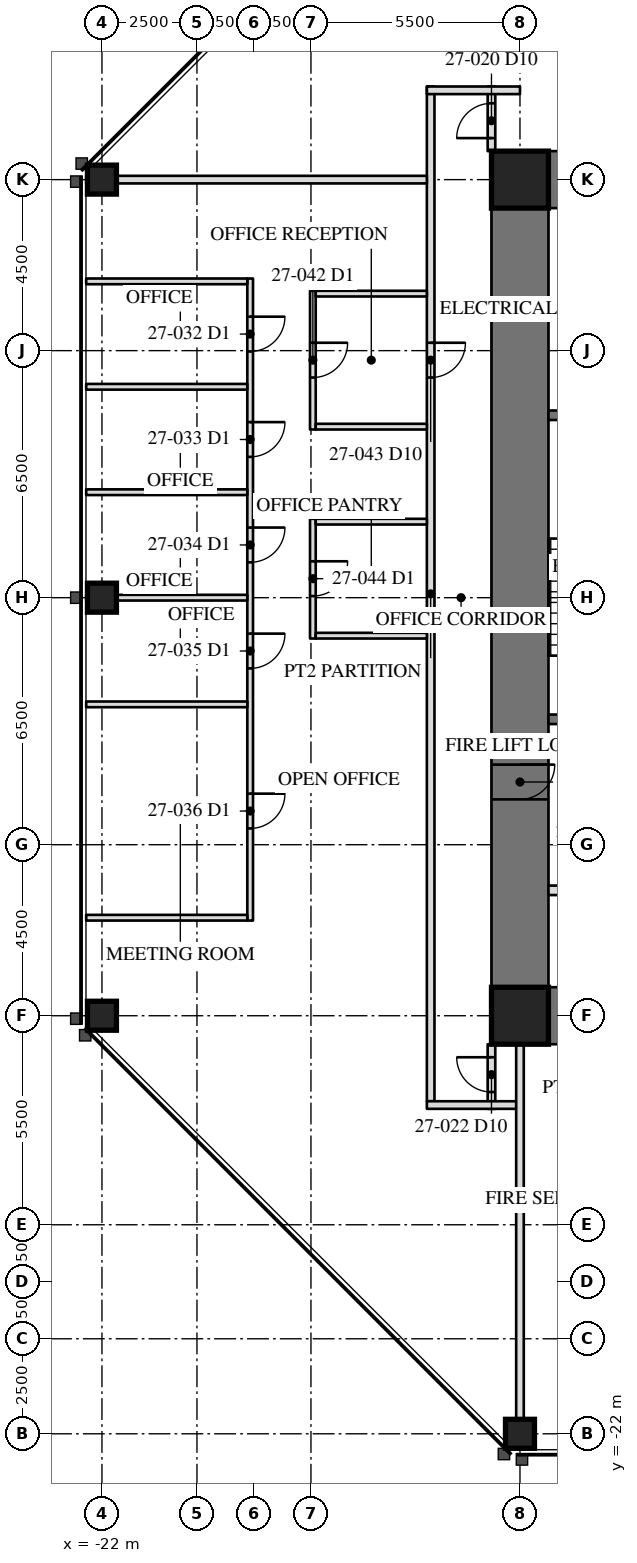
"""IFC4 building model, lengths in metres.
Left out: names, types, materials, properties, quantities, classifications, styles, units other than length and angle.
Written with IfcOpenShell. Run it as: python <this file> out.ifc"""

import sys

from ifc_helpers import new_model, si_unit, direction, frame, frame_2d, origin, origin_2d, place, context, subcontext, project, spatial, rectangle, hollow_rectangle, extrude, element, fill, save


model = new_model("IFC4")
c1 = context("Model", 3, precision=1e-05, world=origin(), true_north=direction((0.0, 1.0)))
c2 = subcontext(c1, "Body", "Model", "MODEL_VIEW")
j1 = project(units=[si_unit("LENGTHUNIT", "METRE"), si_unit("PLANEANGLEUNIT", "RADIAN")], contexts=[c1])
p1 = place(None, origin())
s1 = spatial("IfcSite", under=j1, at=p1, CompositionType="ELEMENT")
p2 = place(p1, origin())
s2 = spatial("IfcBuilding", under=s1, at=p2, CompositionType="ELEMENT")
p3 = place(p2, frame((0.0, 0.0, 117.2)))
s3 = spatial("IfcBuildingStorey", under=s2, at=p3, CompositionType="ELEMENT", Elevation=117.2)
for number, where, z_axis, x_axis in (
    (1, (-22.0, 0.0, 0.0), (0.0, 0.0, 1.0), (0.0, 1.0, 0.0)),
    (2, (-22.0, -11.0, 0.0), (0.0, 0.0, 1.0), (0.0, 1.0, 0.0)),
    (3, (-11.0, -22.0, 0.0), (0.0, 0.0, 1.0), (1.0, 0.0, 0.0)),
    (4, (-22.0, 11.0, 0.0), (0.0, 0.0, 1.0), (0.0, 1.0, 0.0)),
):
    element("IfcColumn", number, at=place(p3, frame(where, z_axis=z_axis, x_axis=x_axis)), inside=s3, PredefinedType="COLUMN", context=c2, shape_type="SweptSolid", body=[
        extrude(hollow_rectangle(XDim=0.762, YDim=0.762, WallThickness=0.127, at=origin_2d()), origin(), (0.0, 0.0, 1.0), 4.1),
    ])
p4 = place(p3, frame((-11.0, 11.0, 0.0), z_axis=(0.0, 0.0, 1.0), x_axis=(0.0, -1.0, 0.0)))
e5 = element("IfcWall", 5, at=p4, inside=s3, PredefinedType="SHEAR", context=c2, shape_type="SweptSolid", body=[
    extrude(rectangle(XDim=22.0, YDim=1.5, at=frame_2d((11.0, 0.0))), origin(), (0.0, 0.0, 1.0), 4.1),
])
p5 = place(p4, frame((15.393, 0.0, 0.0)))
e6 = element("IfcOpeningElement", 6, at=p5, cuts=e5, PredefinedType="OPENING", context=c2, shape_type="SweptSolid", body=[
    extrude(rectangle(XDim=0.915, YDim=2.134, at=frame_2d((0.458, 1.067))), frame((0.0, 0.76, 0.0), z_axis=(0.0, -1.0, 0.0), x_axis=(1.0, 0.0, 0.0)), (0.0, 0.0, 1.0), 1.52),
])
for number, where, z_axis, x_axis in (
    (7, (-6.5, 11.0, 0.0), (0.0, 0.0, 1.0), (-1.0, 0.0, 0.0)),
    (8, (-11.0, -11.0, 0.0), (0.0, 0.0, 1.0), (1.0, 0.0, 0.0)),
):
    element("IfcWall", number, at=place(p3, frame(where, z_axis=z_axis, x_axis=x_axis)), inside=s3, PredefinedType="SHEAR", context=c2, shape_type="SweptSolid", body=[
        extrude(rectangle(XDim=4.5, YDim=1.5, at=frame_2d((2.25, 0.0))), origin(), (0.0, 0.0, 1.0), 4.1),
    ])
for number, where, z_axis, x_axis in (
    (9, (-11.0, 11.0, 0.0), (0.0, 0.0, 1.0), (1.0, 0.0, 0.0)),
    (10, (-11.0, -11.0, 0.0), (0.0, 0.0, 1.0), (1.0, 0.0, 0.0)),
):
    element("IfcColumn", number, at=place(p3, frame(where, z_axis=z_axis, x_axis=x_axis)), inside=s3, PredefinedType="COLUMN", context=c2, shape_type="SweptSolid", body=[
        extrude(hollow_rectangle(XDim=1.499, YDim=1.499, WallThickness=0.102, at=origin_2d()), origin(), (0.0, 0.0, 1.0), 4.1),
    ])
p6 = place(p3, frame((-6.95, 4.8, 0.0), z_axis=(0.0, 0.0, 1.0), x_axis=(-1.0, 0.0, 0.0)))
e11 = element("IfcWall", 11, at=p6, inside=s3, PredefinedType="SOLIDWALL", context=c2, shape_type="SweptSolid", body=[
    extrude(rectangle(XDim=3.3, YDim=0.25, at=frame_2d((1.65, 0.0))), origin(), (0.0, 0.0, 1.0), 3.91),
])
p7 = place(p3, frame((-6.95, -3.2, 0.0), z_axis=(0.0, 0.0, 1.0), x_axis=(-1.0, 0.0, 0.0)))
e12 = element("IfcWall", 12, at=p7, inside=s3, PredefinedType="SOLIDWALL", context=c2, shape_type="SweptSolid", body=[
    extrude(rectangle(XDim=3.3, YDim=0.25, at=frame_2d((1.65, 0.0))), origin(), (0.0, 0.0, 1.0), 3.91),
])
p8 = place(p7, frame((1.116, 0.0, 0.0)))
e13 = element("IfcOpeningElement", 13, at=p8, cuts=e12, PredefinedType="OPENING", context=c2, shape_type="SweptSolid", body=[
    extrude(rectangle(XDim=1.067, YDim=2.134, at=frame_2d((0.533, 1.067))), frame((0.0, 0.135, 0.0), z_axis=(0.0, -1.0, 0.0), x_axis=(1.0, 0.0, 0.0)), (0.0, 0.0, 1.0), 0.27),
])
p9 = place(p3, frame((-6.95, -7.7, 0.0), z_axis=(0.0, 0.0, 1.0), x_axis=(-1.0, 0.0, 0.0)))
e14 = element("IfcWall", 14, at=p9, inside=s3, PredefinedType="PARTITIONING", context=c2, shape_type="SweptSolid", body=[
    extrude(rectangle(XDim=3.3, YDim=0.25, at=frame_2d((1.65, 0.0))), origin(), (0.0, 0.0, 1.0), 3.91),
])
p10 = place(p9, frame((0.45, 0.0, 0.0)))
e15 = element("IfcOpeningElement", 15, at=p10, cuts=e14, PredefinedType="OPENING", context=c2, shape_type="SweptSolid", body=[
    extrude(rectangle(XDim=1.219, YDim=2.134, at=frame_2d((0.609, 1.067))), frame((0.0, 0.135, 0.0), z_axis=(0.0, -1.0, 0.0), x_axis=(1.0, 0.0, 0.0)), (0.0, 0.0, 1.0), 0.27),
])
p11 = place(p3, frame((-13.35, 13.45, 0.0), z_axis=(0.0, 0.0, 1.0), x_axis=(0.0, -1.0, 0.0)))
e16 = element("IfcWall", 16, at=p11, inside=s3, PredefinedType="PARTITIONING", context=c2, shape_type="SweptSolid", body=[
    extrude(rectangle(XDim=26.7, YDim=0.2, at=frame_2d((13.35, 0.0))), origin(), (0.0, 0.0, 1.0), 3.91),
])
p12 = place(p11, frame((6.742, 0.0, 0.0)))
e17 = element("IfcOpeningElement", 17, at=p12, cuts=e16, PredefinedType="OPENING", context=c2, shape_type="SweptSolid", body=[
    extrude(rectangle(XDim=0.915, YDim=2.134, at=frame_2d((0.458, 1.067))), frame((0.0, 0.11, 0.0), z_axis=(0.0, -1.0, 0.0), x_axis=(1.0, 0.0, 0.0)), (0.0, 0.0, 1.0), 0.22),
])
p13 = place(p3, frame((-11.75, 11.75, 0.0), z_axis=(0.0, 0.0, 1.0), x_axis=(0.0, 1.0, 0.0)))
e18 = element("IfcWall", 18, at=p13, inside=s3, PredefinedType="PARTITIONING", context=c2, shape_type="SweptSolid", body=[
    extrude(rectangle(XDim=1.7, YDim=0.2, at=frame_2d((0.85, 0.0))), origin(), (0.0, 0.0, 1.0), 3.91),
])
p14 = place(p13, frame((0.343, 0.0, 0.0)))
e19 = element("IfcOpeningElement", 19, at=p14, cuts=e18, PredefinedType="OPENING", context=c2, shape_type="SweptSolid", body=[
    extrude(rectangle(XDim=0.915, YDim=2.134, at=frame_2d((0.458, 1.067))), frame((0.0, 0.11, 0.0), z_axis=(0.0, -1.0, 0.0), x_axis=(1.0, 0.0, 0.0)), (0.0, 0.0, 1.0), 0.22),
])
p15 = place(p3, frame((-11.0, 13.35, 0.0), z_axis=(0.0, 0.0, 1.0), x_axis=(-1.0, 0.0, 0.0)))
e20 = element("IfcWall", 20, at=p15, inside=s3, PredefinedType="PARTITIONING", context=c2, shape_type="SweptSolid", body=[
    extrude(rectangle(XDim=2.45, YDim=0.2, at=frame_2d((1.225, 0.0))), origin(), (0.0, 0.0, 1.0), 3.91),
])
p16 = place(p3, frame((-11.75, -11.75, 0.0), z_axis=(0.0, 0.0, 1.0), x_axis=(0.0, -1.0, 0.0)))
e21 = element("IfcWall", 21, at=p16, inside=s3, PredefinedType="PARTITIONING", context=c2, shape_type="SweptSolid", body=[
    extrude(rectangle(XDim=1.7, YDim=0.2, at=frame_2d((0.85, 0.0))), origin(), (0.0, 0.0, 1.0), 3.91),
])
p17 = place(p16, frame((0.343, 0.0, 0.0)))
e22 = element("IfcOpeningElement", 22, at=p17, cuts=e21, PredefinedType="OPENING", context=c2, shape_type="SweptSolid", body=[
    extrude(rectangle(XDim=0.915, YDim=2.134, at=frame_2d((0.458, 1.067))), frame((0.0, 0.11, 0.0), z_axis=(0.0, -1.0, 0.0), x_axis=(1.0, 0.0, 0.0)), (0.0, 0.0, 1.0), 0.22),
])
p18 = place(p3, frame((-11.0, -13.35, 0.0), z_axis=(0.0, 0.0, 1.0), x_axis=(-1.0, 0.0, 0.0)))
e23 = element("IfcWall", 23, at=p18, inside=s3, PredefinedType="PARTITIONING", context=c2, shape_type="SweptSolid", body=[
    extrude(rectangle(XDim=2.45, YDim=0.2, at=frame_2d((1.225, 0.0))), origin(), (0.0, 0.0, 1.0), 3.91),
])
p19 = place(p3, frame((-13.45, 11.0, 0.0), z_axis=(0.0, 0.0, 1.0), x_axis=(-1.0, 0.0, 0.0)))
e24 = element("IfcWall", 24, at=p19, inside=s3, PredefinedType="PARTITIONING", context=c2, shape_type="SweptSolid", body=[
    extrude(rectangle(XDim=8.965, YDim=0.2, at=frame_2d((4.482, 0.0))), origin(), (0.0, 0.0, 1.0), 3.326),
])
p20 = place(p3, frame((-11.0, -11.75, 0.0), z_axis=(0.0, 0.0, 1.0), x_axis=(0.0, -1.0, 0.0)))
e25 = element("IfcWall", 25, at=p20, inside=s3, PredefinedType="PARTITIONING", context=c2, shape_type="SweptSolid", body=[
    extrude(rectangle(XDim=10.665, YDim=0.2, at=frame_2d((5.333, 0.0))), origin(), (0.0, 0.0, 1.0), 3.326),
])
p21 = place(p3, frame((-18.1, 8.398, 0.0), z_axis=(0.0, 0.0, 1.0), x_axis=(0.0, -1.0, 0.0)))
e26 = element("IfcWall", 26, at=p21, inside=s3, PredefinedType="PARTITIONING", context=c2, shape_type="SweptSolid", body=[
    extrude(rectangle(XDim=16.894, YDim=0.15, at=frame_2d((8.447, 0.0))), origin(), (0.0, 0.0, 1.0), 3.91),
])
p22 = place(p21, frame((1.004, 0.0, 0.0)))
e27 = element("IfcOpeningElement", 27, at=p22, cuts=e26, PredefinedType="OPENING", context=c2, shape_type="SweptSolid", body=[
    extrude(rectangle(XDim=0.915, YDim=2.134, at=frame_2d((0.458, 1.067))), frame((0.0, 0.085, 0.0), z_axis=(0.0, -1.0, 0.0), x_axis=(1.0, 0.0, 0.0)), (0.0, 0.0, 1.0), 0.17),
])
p23 = place(p21, frame((3.779, 0.0, 0.0)))
e28 = element("IfcOpeningElement", 28, at=p23, cuts=e26, PredefinedType="OPENING", context=c2, shape_type="SweptSolid", body=[
    extrude(rectangle(XDim=0.915, YDim=2.134, at=frame_2d((0.458, 1.067))), frame((0.0, 0.085, 0.0), z_axis=(0.0, -1.0, 0.0), x_axis=(1.0, 0.0, 0.0)), (0.0, 0.0, 1.0), 0.17),
])
p24 = place(p21, frame((6.553, 0.0, 0.0)))
e29 = element("IfcOpeningElement", 29, at=p24, cuts=e26, PredefinedType="OPENING", context=c2, shape_type="SweptSolid", body=[
    extrude(rectangle(XDim=0.915, YDim=2.134, at=frame_2d((0.458, 1.067))), frame((0.0, 0.085, 0.0), z_axis=(0.0, -1.0, 0.0), x_axis=(1.0, 0.0, 0.0)), (0.0, 0.0, 1.0), 0.17),
])
p25 = place(p21, frame((9.344, 0.0, 0.0)))
e30 = element("IfcOpeningElement", 30, at=p25, cuts=e26, PredefinedType="OPENING", context=c2, shape_type="SweptSolid", body=[
    extrude(rectangle(XDim=0.915, YDim=2.134, at=frame_2d((0.458, 1.067))), frame((0.0, 0.085, 0.0), z_axis=(0.0, -1.0, 0.0), x_axis=(1.0, 0.0, 0.0)), (0.0, 0.0, 1.0), 0.17),
])
p26 = place(p21, frame((13.554, 0.0, 0.0)))
e31 = element("IfcOpeningElement", 31, at=p26, cuts=e26, PredefinedType="OPENING", context=c2, shape_type="SweptSolid", body=[
    extrude(rectangle(XDim=0.915, YDim=2.134, at=frame_2d((0.458, 1.067))), frame((0.0, 0.085, 0.0), z_axis=(0.0, -1.0, 0.0), x_axis=(1.0, 0.0, 0.0)), (0.0, 0.0, 1.0), 0.17),
])
for number, where, z_axis, x_axis in (
    (32, (-18.175, 8.323, 0.0), (0.0, 0.0, 1.0), (-1.0, 0.0, 0.0)),
    (33, (-18.175, 5.549, 0.0), (0.0, 0.0, 1.0), (-1.0, 0.0, 0.0)),
    (34, (-18.175, 2.775, 0.0), (0.0, 0.0, 1.0), (-1.0, 0.0, 0.0)),
):
    element("IfcWall", number, at=place(p3, frame(where, z_axis=z_axis, x_axis=x_axis)), inside=s3, PredefinedType="PARTITIONING", context=c2, shape_type="SweptSolid", body=[
        extrude(rectangle(XDim=4.24, YDim=0.15, at=frame_2d((2.12, 0.0))), origin(), (0.0, 0.0, 1.0), 3.91),
    ])
p27 = place(p3, frame((-18.175, 0.0, 0.0), z_axis=(0.0, 0.0, 1.0), x_axis=(-1.0, 0.0, 0.0)))
e35 = element("IfcWall", 35, at=p27, inside=s3, PredefinedType="PARTITIONING", context=c2, shape_type="SweptSolid", body=[
    extrude(rectangle(XDim=4.24, YDim=0.15, at=frame_2d((2.12, 0.0))), origin(), (0.0, 0.0, 1.0), 3.326),
])
for number, where, z_axis, x_axis in (
    (36, (-18.175, -2.807, 0.0), (0.0, 0.0, 1.0), (-1.0, 0.0, 0.0)),
    (37, (-18.175, -8.421, 0.0), (0.0, 0.0, 1.0), (-1.0, 0.0, 0.0)),
):
    element("IfcWall", number, at=place(p3, frame(where, z_axis=z_axis, x_axis=x_axis)), inside=s3, PredefinedType="PARTITIONING", context=c2, shape_type="SweptSolid", body=[
        extrude(rectangle(XDim=4.24, YDim=0.15, at=frame_2d((2.12, 0.0))), origin(), (0.0, 0.0, 1.0), 3.91),
    ])
p28 = place(p3, frame((-16.45, 8.075, 0.0), z_axis=(0.0, 0.0, 1.0), x_axis=(0.0, -1.0, 0.0)))
e38 = element("IfcWall", 38, at=p28, inside=s3, PredefinedType="PARTITIONING", context=c2, shape_type="SweptSolid", body=[
    extrude(rectangle(XDim=3.65, YDim=0.15, at=frame_2d((1.825, 0.0))), origin(), (0.0, 0.0, 1.0), 3.91),
])
p29 = place(p28, frame((1.367, 0.0, 0.0)))
e39 = element("IfcOpeningElement", 39, at=p29, cuts=e38, PredefinedType="OPENING", context=c2, shape_type="SweptSolid", body=[
    extrude(rectangle(XDim=0.915, YDim=2.134, at=frame_2d((0.458, 1.067))), frame((0.0, 0.085, 0.0), z_axis=(0.0, -1.0, 0.0), x_axis=(1.0, 0.0, 0.0)), (0.0, 0.0, 1.0), 0.17),
])
for number, where, z_axis, x_axis in (
    (40, (-16.375, 8.0, 0.0), (0.0, 0.0, 1.0), (1.0, 0.0, 0.0)),
    (41, (-16.375, 4.5, 0.0), (0.0, 0.0, 1.0), (1.0, 0.0, 0.0)),
):
    element("IfcWall", number, at=place(p3, frame(where, z_axis=z_axis, x_axis=x_axis)), inside=s3, PredefinedType="PARTITIONING", context=c2, shape_type="SweptSolid", body=[
        extrude(rectangle(XDim=2.925, YDim=0.15, at=frame_2d((1.462, 0.0))), origin(), (0.0, 0.0, 1.0), 3.91),
    ])
p30 = place(p3, frame((-16.45, 2.075, 0.0), z_axis=(0.0, 0.0, 1.0), x_axis=(0.0, -1.0, 0.0)))
e42 = element("IfcWall", 42, at=p30, inside=s3, PredefinedType="PARTITIONING", context=c2, shape_type="SweptSolid", body=[
    extrude(rectangle(XDim=3.15, YDim=0.15, at=frame_2d((1.575, 0.0))), origin(), (0.0, 0.0, 1.0), 3.91),
])
p31 = place(p30, frame((1.117, 0.0, 0.0)))
e43 = element("IfcOpeningElement", 43, at=p31, cuts=e42, PredefinedType="OPENING", context=c2, shape_type="SweptSolid", body=[
    extrude(rectangle(XDim=0.915, YDim=2.134, at=frame_2d((0.458, 1.067))), frame((0.0, 0.085, 0.0), z_axis=(0.0, -1.0, 0.0), x_axis=(1.0, 0.0, 0.0)), (0.0, 0.0, 1.0), 0.17),
])
for number, where, z_axis, x_axis in (
    (44, (-16.375, 2.0, 0.0), (0.0, 0.0, 1.0), (1.0, 0.0, 0.0)),
    (45, (-16.375, -1.0, 0.0), (0.0, 0.0, 1.0), (1.0, 0.0, 0.0)),
):
    element("IfcWall", number, at=place(p3, frame(where, z_axis=z_axis, x_axis=x_axis)), inside=s3, PredefinedType="PARTITIONING", context=c2, shape_type="SweptSolid", body=[
        extrude(rectangle(XDim=2.925, YDim=0.15, at=frame_2d((1.462, 0.0))), origin(), (0.0, 0.0, 1.0), 3.91),
    ])
p32 = place(p5, origin())
e46 = element("IfcDoor", 46, at=p32, inside=s3, OperationType="SINGLE_SWING_RIGHT", PredefinedType="DOOR", context=c2, shape_type="SweptSolid", body=[
    extrude(rectangle(XDim=0.915, YDim=2.134, at=frame_2d((0.458, 1.067))), frame((0.0, -0.675, 0.0), z_axis=(0.0, -1.0, 0.0), x_axis=(1.0, 0.0, 0.0)), (0.0, 0.0, 1.0), 0.05),
])
fill(e6, e46)
p33 = place(p14, origin())
e47 = element("IfcDoor", 47, at=p33, inside=s3, OperationType="SINGLE_SWING_LEFT", PredefinedType="DOOR", context=c2, shape_type="SweptSolid", body=[
    extrude(rectangle(XDim=0.915, YDim=2.134, at=frame_2d((0.458, 1.067))), frame((0.0, 0.025, 0.0), z_axis=(0.0, -1.0, 0.0), x_axis=(1.0, 0.0, 0.0)), (0.0, 0.0, 1.0), 0.05),
])
fill(e19, e47)
p34 = place(p17, frame((0.915, 0.0, 0.0), z_axis=(0.0, 0.0, 1.0), x_axis=(-1.0, 0.0, 0.0)))
e48 = element("IfcDoor", 48, at=p34, inside=s3, OperationType="SINGLE_SWING_LEFT", PredefinedType="DOOR", context=c2, shape_type="SweptSolid", body=[
    extrude(rectangle(XDim=0.915, YDim=2.134, at=frame_2d((0.458, 1.067))), frame((0.0, 0.025, 0.0), z_axis=(0.0, -1.0, 0.0), x_axis=(1.0, 0.0, 0.0)), (0.0, 0.0, 1.0), 0.05),
])
fill(e22, e48)
p35 = place(p22, origin())
e49 = element("IfcDoor", 49, at=p35, inside=s3, OperationType="SINGLE_SWING_LEFT", PredefinedType="DOOR", context=c2, shape_type="SweptSolid", body=[
    extrude(rectangle(XDim=0.915, YDim=2.134, at=frame_2d((0.458, 1.067))), frame((0.0, 0.025, 0.0), z_axis=(0.0, -1.0, 0.0), x_axis=(1.0, 0.0, 0.0)), (0.0, 0.0, 1.0), 0.05),
])
fill(e27, e49)
p36 = place(p23, origin())
e50 = element("IfcDoor", 50, at=p36, inside=s3, OperationType="SINGLE_SWING_LEFT", PredefinedType="DOOR", context=c2, shape_type="SweptSolid", body=[
    extrude(rectangle(XDim=0.915, YDim=2.134, at=frame_2d((0.458, 1.067))), frame((0.0, 0.025, 0.0), z_axis=(0.0, -1.0, 0.0), x_axis=(1.0, 0.0, 0.0)), (0.0, 0.0, 1.0), 0.05),
])
fill(e28, e50)
p37 = place(p24, origin())
e51 = element("IfcDoor", 51, at=p37, inside=s3, OperationType="SINGLE_SWING_LEFT", PredefinedType="DOOR", context=c2, shape_type="SweptSolid", body=[
    extrude(rectangle(XDim=0.915, YDim=2.134, at=frame_2d((0.458, 1.067))), frame((0.0, 0.025, 0.0), z_axis=(0.0, -1.0, 0.0), x_axis=(1.0, 0.0, 0.0)), (0.0, 0.0, 1.0), 0.05),
])
fill(e29, e51)
p38 = place(p25, origin())
e52 = element("IfcDoor", 52, at=p38, inside=s3, OperationType="SINGLE_SWING_LEFT", PredefinedType="DOOR", context=c2, shape_type="SweptSolid", body=[
    extrude(rectangle(XDim=0.915, YDim=2.134, at=frame_2d((0.458, 1.067))), frame((0.0, 0.025, 0.0), z_axis=(0.0, -1.0, 0.0), x_axis=(1.0, 0.0, 0.0)), (0.0, 0.0, 1.0), 0.05),
])
fill(e30, e52)
p39 = place(p26, origin())
e53 = element("IfcDoor", 53, at=p39, inside=s3, OperationType="SINGLE_SWING_LEFT", PredefinedType="DOOR", context=c2, shape_type="SweptSolid", body=[
    extrude(rectangle(XDim=0.915, YDim=2.134, at=frame_2d((0.458, 1.067))), frame((0.0, 0.025, 0.0), z_axis=(0.0, -1.0, 0.0), x_axis=(1.0, 0.0, 0.0)), (0.0, 0.0, 1.0), 0.05),
])
fill(e31, e53)
p40 = place(p29, origin())
e54 = element("IfcDoor", 54, at=p40, inside=s3, OperationType="SINGLE_SWING_LEFT", PredefinedType="DOOR", context=c2, shape_type="SweptSolid", body=[
    extrude(rectangle(XDim=0.915, YDim=2.134, at=frame_2d((0.458, 1.067))), frame((0.0, 0.025, 0.0), z_axis=(0.0, -1.0, 0.0), x_axis=(1.0, 0.0, 0.0)), (0.0, 0.0, 1.0), 0.05),
])
fill(e39, e54)
p41 = place(p12, origin())
e55 = element("IfcDoor", 55, at=p41, inside=s3, OperationType="SINGLE_SWING_LEFT", PredefinedType="DOOR", context=c2, shape_type="SweptSolid", body=[
    extrude(rectangle(XDim=0.915, YDim=2.134, at=frame_2d((0.458, 1.067))), frame((0.0, 0.025, 0.0), z_axis=(0.0, -1.0, 0.0), x_axis=(1.0, 0.0, 0.0)), (0.0, 0.0, 1.0), 0.05),
])
fill(e17, e55)
p42 = place(p31, origin())
e56 = element("IfcDoor", 56, at=p42, inside=s3, OperationType="SINGLE_SWING_LEFT", PredefinedType="DOOR", context=c2, shape_type="SweptSolid", body=[
    extrude(rectangle(XDim=0.915, YDim=2.134, at=frame_2d((0.458, 1.067))), frame((0.0, 0.025, 0.0), z_axis=(0.0, -1.0, 0.0), x_axis=(1.0, 0.0, 0.0)), (0.0, 0.0, 1.0), 0.05),
])
fill(e43, e56)
save(model, sys.argv[1])
